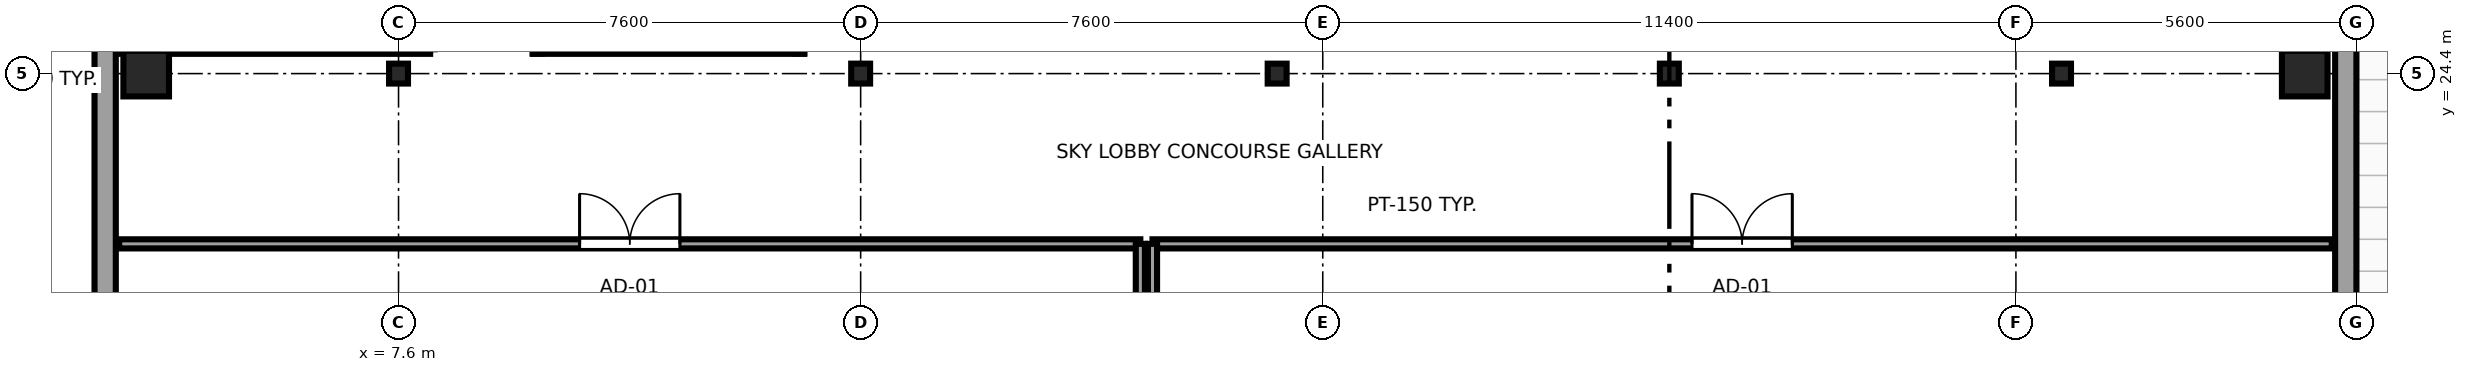
"""IFC4 building model, lengths in metres.
Left out: names, types, materials, properties, quantities, classifications, styles, units other than length and angle.
Written with IfcOpenShell. Run it as: python <this file> out.ifc"""

import sys

from ifc_helpers import new_model, si_unit, direction, frame, frame_2d, origin, origin_2d, place, context, subcontext, project, spatial, rectangle, i_section, extrude, source, transform, mapped, element, fill, save


model = new_model("IFC4")
c1 = context("Model", 3, precision=1e-05, world=origin(), true_north=direction((0.0, 1.0)))
c2 = subcontext(c1, "Body", "Model", "MODEL_VIEW")
j1 = project(units=[si_unit("LENGTHUNIT", "METRE"), si_unit("PLANEANGLEUNIT", "RADIAN")], contexts=[c1])
p1 = place(None, origin())
s1 = spatial("IfcSite", under=j1, at=p1, CompositionType="ELEMENT")
p2 = place(p1, origin())
s2 = spatial("IfcBuilding", under=s1, at=p2, CompositionType="ELEMENT")
p3 = place(p2, frame((0.0, 0.0, 205.3)))
s3 = spatial("IfcBuildingStorey", under=s2, at=p3, CompositionType="ELEMENT", Elevation=205.3)
m1 = source(origin(), c2, "Body", "SweptSolid", [
    extrude(rectangle(XDim=0.75, YDim=0.75, at=origin_2d()), origin(), (0.0, 0.0, 1.0), 4.4),
])
p4 = place(p3, frame((3.45, 24.4, 0.0), z_axis=(0.0, 0.0, 1.0), x_axis=(1.0, 0.0, 0.0)))
e1 = element("IfcColumn", 1, at=p4, inside=s3, PredefinedType="COLUMN", context=c2, shape_type="MappedRepresentation", body=[
    mapped(m1, transform((0.0, 0.0, 0.0), x_axis=(1.0, 0.0, 0.0), y_axis=(0.0, 1.0, 0.0), z_axis=(0.0, 0.0, 1.0), scale=1.0)),
])
m2 = source(origin(), c2, "Body", "SweptSolid", [
    extrude(i_section(OverallWidth=0.311, OverallDepth=0.327, WebThickness=0.016, FlangeThickness=0.025, FilletRadius=0.017, at=origin_2d()), origin(), (0.0, 0.0, 1.0), 4.4),
])
for number, where, z_axis, x_axis in (
    (2, (7.6, 24.4, 0.0), (0.0, 0.0, 1.0), (1.0, 0.0, 0.0)),
    (3, (15.2, 24.4, 0.0), (0.0, 0.0, 1.0), (1.0, 0.0, 0.0)),
    (4, (22.05, 24.4, 0.0), (0.0, 0.0, 1.0), (1.0, 0.0, 0.0)),
    (5, (28.5, 24.4, 0.0), (0.0, 0.0, 1.0), (1.0, 0.0, 0.0)),
    (6, (34.95, 24.4, 0.0), (0.0, 0.0, 1.0), (1.0, 0.0, 0.0)),
):
    element("IfcColumn", number, at=place(p3, frame(where, z_axis=z_axis, x_axis=x_axis)), inside=s3, PredefinedType="COLUMN", context=c2, shape_type="MappedRepresentation", body=[
        mapped(m2, transform((0.0, 0.0, 0.0), x_axis=(1.0, 0.0, 0.0), y_axis=(0.0, 1.0, 0.0), z_axis=(0.0, 0.0, 1.0), scale=1.0)),
    ])
p5 = place(p3, frame((38.95, 24.4, 0.0), z_axis=(0.0, 0.0, 1.0), x_axis=(1.0, 0.0, 0.0)))
e7 = element("IfcColumn", 7, at=p5, inside=s3, PredefinedType="COLUMN", context=c2, shape_type="MappedRepresentation", body=[
    mapped(m1, transform((0.0, 0.0, 0.0), x_axis=(1.0, 0.0, 0.0), y_axis=(0.0, 1.0, 0.0), z_axis=(0.0, 0.0, 1.0), scale=1.0)),
])
p6 = place(p3, frame((39.625, 7.017, 0.0), z_axis=(0.0, 0.0, 1.0), x_axis=(0.0, 1.0, 0.0)))
e8 = element("IfcWall", 8, at=p6, inside=s3, PredefinedType="SOLIDWALL", context=c2, shape_type="SweptSolid", body=[
    extrude(rectangle(XDim=24.579, YDim=0.35, at=frame_2d((12.29, 0.0))), origin(), (0.0, 0.0, 1.0), 4.22),
])
p7 = place(p6, frame((5.983, 0.0, 0.0), z_axis=(0.0, 0.0, 1.0), x_axis=(-1.0, 0.0, 0.0)))
e9 = element("IfcOpeningElement", 9, at=p7, cuts=e8, PredefinedType="OPENING", context=c2, shape_type="SweptSolid", body=[
    extrude(rectangle(XDim=1.8, YDim=2.15, at=frame_2d((0.9, 1.075))), frame((0.0, 0.185, 0.0), z_axis=(0.0, -1.0, 0.0), x_axis=(1.0, 0.0, 0.0)), (0.0, 0.0, 1.0), 0.37),
])
p8 = place(p6, frame((10.939, 0.0, 0.68)))
e10 = element("IfcOpeningElement", 10, at=p8, cuts=e8, PredefinedType="OPENING", context=c2, shape_type="SweptSolid", body=[
    extrude(rectangle(XDim=2.7, YDim=1.95, at=frame_2d((1.35, 0.975))), frame((0.0, 0.185, 0.0), z_axis=(0.0, -1.0, 0.0), x_axis=(1.0, 0.0, 0.0)), (0.0, 0.0, 1.0), 0.37),
])
p9 = place(p6, frame((19.741, 0.0, 0.68)))
e11 = element("IfcOpeningElement", 11, at=p9, cuts=e8, PredefinedType="OPENING", context=c2, shape_type="SweptSolid", body=[
    extrude(rectangle(XDim=2.7, YDim=1.95, at=frame_2d((1.35, 0.975))), frame((0.0, 0.185, 0.0), z_axis=(0.0, -1.0, 0.0), x_axis=(1.0, 0.0, 0.0)), (0.0, 0.0, 1.0), 0.37),
])
p10 = place(p3, frame((2.775, 41.583, 0.0), z_axis=(0.0, 0.0, 1.0), x_axis=(0.0, -1.0, 0.0)))
e12 = element("IfcWall", 12, at=p10, inside=s3, PredefinedType="SOLIDWALL", context=c2, shape_type="SweptSolid", body=[
    extrude(rectangle(XDim=34.566, YDim=0.35, at=frame_2d((17.283, 0.0))), origin(), (0.0, 0.0, 1.0), 4.22),
])
p11 = place(p10, frame((1.335, 0.0, 0.68)))
e13 = element("IfcOpeningElement", 13, at=p11, cuts=e12, PredefinedType="OPENING", context=c2, shape_type="SweptSolid", body=[
    extrude(rectangle(XDim=2.7, YDim=1.95, at=frame_2d((1.35, 0.975))), frame((0.0, 0.185, 0.0), z_axis=(0.0, -1.0, 0.0), x_axis=(1.0, 0.0, 0.0)), (0.0, 0.0, 1.0), 0.37),
])
p12 = place(p10, frame((13.297, 0.0, 0.68)))
e14 = element("IfcOpeningElement", 14, at=p12, cuts=e12, PredefinedType="OPENING", context=c2, shape_type="SweptSolid", body=[
    extrude(rectangle(XDim=2.7, YDim=1.95, at=frame_2d((1.35, 0.975))), frame((0.0, 0.185, 0.0), z_axis=(0.0, -1.0, 0.0), x_axis=(1.0, 0.0, 0.0)), (0.0, 0.0, 1.0), 0.37),
])
p13 = place(p10, frame((22.189, 0.0, 0.68)))
e15 = element("IfcOpeningElement", 15, at=p13, cuts=e12, PredefinedType="OPENING", context=c2, shape_type="SweptSolid", body=[
    extrude(rectangle(XDim=2.7, YDim=1.95, at=frame_2d((1.35, 0.975))), frame((0.0, 0.185, 0.0), z_axis=(0.0, -1.0, 0.0), x_axis=(1.0, 0.0, 0.0)), (0.0, 0.0, 1.0), 0.37),
])
p14 = place(p10, frame((26.36, 0.0, 0.68)))
e16 = element("IfcOpeningElement", 16, at=p14, cuts=e12, PredefinedType="OPENING", context=c2, shape_type="SweptSolid", body=[
    extrude(rectangle(XDim=2.7, YDim=1.95, at=frame_2d((1.35, 0.975))), frame((0.0, 0.185, 0.0), z_axis=(0.0, -1.0, 0.0), x_axis=(1.0, 0.0, 0.0)), (0.0, 0.0, 1.0), 0.37),
])
p15 = place(p10, frame((29.98, 0.0, 0.68)))
e17 = element("IfcOpeningElement", 17, at=p15, cuts=e12, PredefinedType="OPENING", context=c2, shape_type="SweptSolid", body=[
    extrude(rectangle(XDim=2.7, YDim=1.95, at=frame_2d((1.35, 0.975))), frame((0.0, 0.185, 0.0), z_axis=(0.0, -1.0, 0.0), x_axis=(1.0, 0.0, 0.0)), (0.0, 0.0, 1.0), 0.37),
])
p16 = place(p3, frame((3.005, 21.6, 0.0), z_axis=(0.0, 0.0, 1.0), x_axis=(1.0, 0.0, 0.0)))
e18 = element("IfcWall", 18, at=p16, inside=s3, PredefinedType="PARTITIONING", context=c2, shape_type="SweptSolid", body=[
    extrude(rectangle(XDim=16.795, YDim=0.15, at=frame_2d((8.397, 0.0))), origin(), (0.0, 0.0, 1.0), 4.22),
])
p17 = place(p16, frame((7.573, 0.0, 0.0)))
e19 = element("IfcOpeningElement", 19, at=p17, cuts=e18, PredefinedType="OPENING", context=c2, shape_type="SweptSolid", body=[
    extrude(rectangle(XDim=1.65, YDim=2.15, at=frame_2d((0.825, 1.075))), frame((0.0, 0.085, 0.0), z_axis=(0.0, -1.0, 0.0), x_axis=(1.0, 0.0, 0.0)), (0.0, 0.0, 1.0), 0.17),
])
p18 = place(p3, frame((19.8, 3.005, 0.0), z_axis=(0.0, 0.0, 1.0), x_axis=(0.0, 1.0, 0.0)))
e20 = element("IfcWall", 20, at=p18, inside=s3, PredefinedType="PARTITIONING", context=c2, shape_type="SweptSolid", body=[
    extrude(rectangle(XDim=18.595, YDim=0.15, at=frame_2d((9.298, 0.0))), origin(), (0.0, 0.0, 1.0), 4.22),
])
p19 = place(p3, frame((20.0, 21.6, 0.0), z_axis=(0.0, 0.0, 1.0), x_axis=(1.0, 0.0, 0.0)))
e21 = element("IfcWall", 21, at=p19, inside=s3, PredefinedType="PARTITIONING", context=c2, shape_type="SweptSolid", body=[
    extrude(rectangle(XDim=19.395, YDim=0.15, at=frame_2d((9.698, 0.0))), origin(), (0.0, 0.0, 1.0), 4.22),
])
p20 = place(p19, frame((8.873, 0.0, 0.0)))
e22 = element("IfcOpeningElement", 22, at=p20, cuts=e21, PredefinedType="OPENING", context=c2, shape_type="SweptSolid", body=[
    extrude(rectangle(XDim=1.65, YDim=2.15, at=frame_2d((0.825, 1.075))), frame((0.0, 0.085, 0.0), z_axis=(0.0, -1.0, 0.0), x_axis=(1.0, 0.0, 0.0)), (0.0, 0.0, 1.0), 0.17),
])
p21 = place(p3, frame((20.0, 3.005, 0.0), z_axis=(0.0, 0.0, 1.0), x_axis=(0.0, 1.0, 0.0)))
e23 = element("IfcWall", 23, at=p21, inside=s3, PredefinedType="PARTITIONING", context=c2, shape_type="SweptSolid", body=[
    extrude(rectangle(XDim=18.595, YDim=0.15, at=frame_2d((9.298, 0.0))), origin(), (0.0, 0.0, 1.0), 4.22),
])
p22 = place(p3, frame((9.81, 24.8, 0.0), z_axis=(0.0, 0.0, 1.0), x_axis=(1.0, 0.0, 0.0)))
e24 = element("IfcWall", 24, at=p22, inside=s3, PredefinedType="PARTITIONING", context=c2, shape_type="SweptSolid", body=[
    extrude(rectangle(XDim=4.46, YDim=0.15, at=frame_2d((2.23, 0.0))), origin(), (0.0, 0.0, 1.0), 4.22),
])
p23 = place(p3, frame((9.88, 24.73, 0.0), z_axis=(0.0, 0.0, 1.0), x_axis=(0.0, 1.0, 0.0)))
e25 = element("IfcWall", 25, at=p23, inside=s3, PredefinedType="PARTITIONING", context=c2, shape_type="SweptSolid", body=[
    extrude(rectangle(XDim=3.54, YDim=0.15, at=frame_2d((1.77, 0.0))), origin(), (0.0, 0.0, 1.0), 4.22),
])
p24 = place(p23, frame((1.31, 0.0, 0.0)))
e26 = element("IfcOpeningElement", 26, at=p24, cuts=e25, PredefinedType="OPENING", context=c2, shape_type="SweptSolid", body=[
    extrude(rectangle(XDim=0.92, YDim=2.01, at=frame_2d((0.46, 1.005))), frame((0.0, 0.085, 0.0), z_axis=(0.0, -1.0, 0.0), x_axis=(1.0, 0.0, 0.0)), (0.0, 0.0, 1.0), 0.17),
])
p25 = place(p3, frame((14.2, 24.73, 0.0), z_axis=(0.0, 0.0, 1.0), x_axis=(0.0, 1.0, 0.0)))
e27 = element("IfcWall", 27, at=p25, inside=s3, PredefinedType="PARTITIONING", context=c2, shape_type="SweptSolid", body=[
    extrude(rectangle(XDim=3.54, YDim=0.15, at=frame_2d((1.77, 0.0))), origin(), (0.0, 0.0, 1.0), 4.22),
])
p26 = place(p3, frame((3.005, 24.8, 0.0), z_axis=(0.0, 0.0, 1.0), x_axis=(1.0, 0.0, 0.0)))
e28 = element("IfcWall", 28, at=p26, inside=s3, PredefinedType="PARTITIONING", context=c2, shape_type="SweptSolid", body=[
    extrude(rectangle(XDim=5.115, YDim=0.15, at=frame_2d((2.558, 0.0))), origin(), (0.0, 0.0, 1.0), 4.22),
])
m3 = source(origin(), c2, "Body", "SweptSolid", [
    extrude(rectangle(XDim=1.65, YDim=2.15, at=frame_2d((0.825, 1.075))), frame((0.0, 0.025, 0.0), z_axis=(0.0, -1.0, 0.0), x_axis=(1.0, 0.0, 0.0)), (0.0, 0.0, 1.0), 0.05),
])
p27 = place(p17, origin())
e29 = element("IfcDoor", 29, at=p27, inside=s3, OperationType="DOUBLE_DOOR_SINGLE_SWING", PredefinedType="DOOR", context=c2, shape_type="MappedRepresentation", body=[
    mapped(m3, transform((0.0, 0.0, 0.0), x_axis=(1.0, 0.0, 0.0), y_axis=(0.0, 1.0, 0.0), z_axis=(0.0, 0.0, 1.0), scale=1.0)),
])
fill(e19, e29)
p28 = place(p20, origin())
e30 = element("IfcDoor", 30, at=p28, inside=s3, OperationType="DOUBLE_DOOR_SINGLE_SWING", PredefinedType="DOOR", context=c2, shape_type="MappedRepresentation", body=[
    mapped(m3, transform((0.0, 0.0, 0.0), x_axis=(1.0, 0.0, 0.0), y_axis=(0.0, 1.0, 0.0), z_axis=(0.0, 0.0, 1.0), scale=1.0)),
])
fill(e22, e30)
save(model, sys.argv[1])
